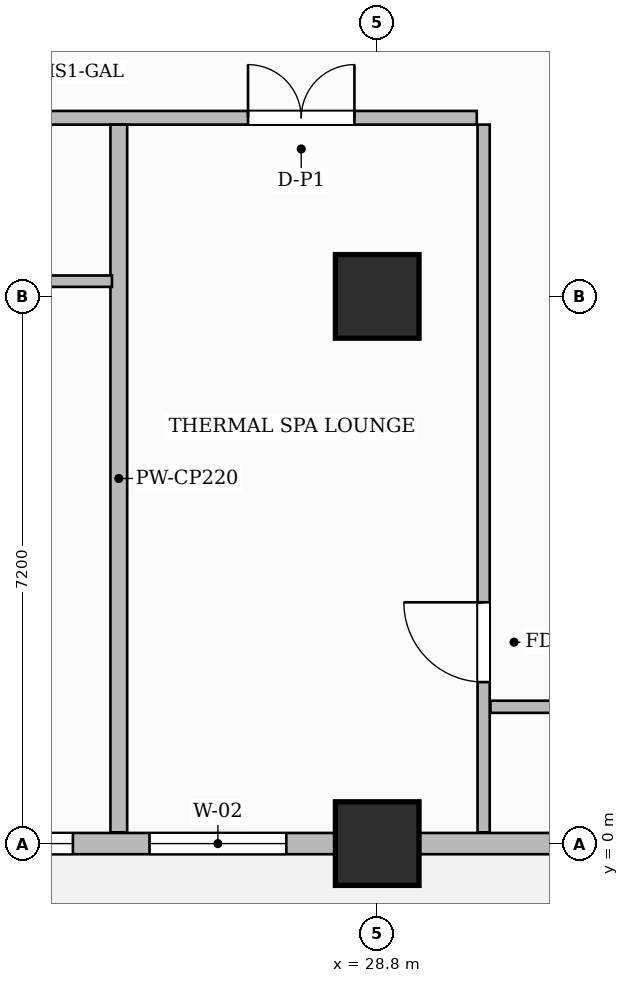
"""IFC4 building model, lengths in metres.
Left out: names, types, materials, properties, quantities, classifications, styles, units other than length and angle.
Written with IfcOpenShell. Run it as: python <this file> out.ifc"""

import sys

from ifc_helpers import new_model, si_unit, direction, frame, frame_2d, origin, origin_2d, place, context, subcontext, project, spatial, rectangle, extrude, source, transform, mapped, element, fill, save


model = new_model("IFC4")
c1 = context("Model", 3, precision=1e-05, world=origin(), true_north=direction((0.0, 1.0)))
c2 = subcontext(c1, "Body", "Model", "MODEL_VIEW")
j1 = project(units=[si_unit("LENGTHUNIT", "METRE"), si_unit("PLANEANGLEUNIT", "RADIAN")], contexts=[c1])
p1 = place(None, origin())
s1 = spatial("IfcSite", under=j1, at=p1, CompositionType="ELEMENT")
p2 = place(p1, origin())
s2 = spatial("IfcBuilding", under=s1, at=p2, CompositionType="ELEMENT")
p3 = place(p2, frame((0.0, 0.0, 58.3)))
s3 = spatial("IfcBuildingStorey", under=s2, at=p3, CompositionType="ELEMENT", Elevation=58.3)
m1 = source(origin(), c2, "Body", "SweptSolid", [
    extrude(rectangle(XDim=1.1, YDim=1.1, at=origin_2d()), origin(), (0.0, 0.0, 1.0), 3.7),
])
for number, where, z_axis, x_axis in (
    (1, (28.8, 0.0, 0.0), (0.0, 0.0, 1.0), (1.0, 0.0, 0.0)),
    (2, (28.8, 7.2, 0.0), (0.0, 0.0, 1.0), (1.0, 0.0, 0.0)),
):
    element("IfcColumn", number, at=place(p3, frame(where, z_axis=z_axis, x_axis=x_axis)), inside=s3, PredefinedType="COLUMN", context=c2, shape_type="MappedRepresentation", body=[
        mapped(m1, transform((0.0, 0.0, 0.0), scale=1.0)),
    ])
p4 = place(p3, frame((14.548, 9.55, 0.0), z_axis=(0.0, 0.0, 1.0), x_axis=(1.0, 0.0, 0.0)))
e3 = element("IfcWall", 3, at=p4, inside=s3, PredefinedType="PARTITIONING", context=c2, shape_type="SweptSolid", body=[
    extrude(rectangle(XDim=15.562, YDim=0.18, at=frame_2d((7.781, 0.0))), origin(), (0.0, 0.0, 1.0), 3.45),
])
p5 = place(p4, frame((3.082, 0.0, 0.0)))
e4 = element("IfcOpeningElement", 4, at=p5, cuts=e3, PredefinedType="OPENING", context=c2, shape_type="SweptSolid", body=[
    extrude(rectangle(XDim=1.05, YDim=2.25, at=frame_2d((0.525, 1.125))), frame((0.0, 0.1, 0.0), z_axis=(0.0, -1.0, 0.0), x_axis=(1.0, 0.0, 0.0)), (0.0, 0.0, 1.0), 0.2),
])
p6 = place(p4, frame((12.552, 0.0, 0.0)))
e5 = element("IfcOpeningElement", 5, at=p6, cuts=e3, PredefinedType="OPENING", context=c2, shape_type="SweptSolid", body=[
    extrude(rectangle(XDim=1.4, YDim=2.35, at=frame_2d((0.7, 1.175))), frame((0.0, 0.1, 0.0), z_axis=(0.0, -1.0, 0.0), x_axis=(1.0, 0.0, 0.0)), (0.0, 0.0, 1.0), 0.2),
])
p7 = place(p3, frame((30.2, 0.148, 0.0), z_axis=(0.0, 0.0, 1.0), x_axis=(0.0, 1.0, 0.0)))
e6 = element("IfcWall", 6, at=p7, inside=s3, PredefinedType="PARTITIONING", context=c2, shape_type="SweptSolid", body=[
    extrude(rectangle(XDim=9.312, YDim=0.16, at=frame_2d((4.656, 0.0))), origin(), (0.0, 0.0, 1.0), 3.45),
])
p8 = place(p7, frame((1.977, 0.0, 0.0)))
e7 = element("IfcOpeningElement", 7, at=p8, cuts=e6, PredefinedType="OPENING", context=c2, shape_type="SweptSolid", body=[
    extrude(rectangle(XDim=1.05, YDim=2.15, at=frame_2d((0.525, 1.075))), frame((0.0, 0.09, 0.0), z_axis=(0.0, -1.0, 0.0), x_axis=(1.0, 0.0, 0.0)), (0.0, 0.0, 1.0), 0.18),
])
p9 = place(p3, frame((30.29, 1.8, 0.0), z_axis=(0.0, 0.0, 1.0), x_axis=(1.0, 0.0, 0.0)))
e8 = element("IfcWall", 8, at=p9, inside=s3, PredefinedType="PARTITIONING", context=c2, shape_type="SweptSolid", body=[
    extrude(rectangle(XDim=19.37, YDim=0.16, at=frame_2d((9.685, 0.0))), origin(), (0.0, 0.0, 1.0), 3.45),
])
p10 = place(p9, frame((9.735, 0.0, 0.0)))
e9 = element("IfcOpeningElement", 9, at=p10, cuts=e8, PredefinedType="OPENING", context=c2, shape_type="SweptSolid", body=[
    extrude(rectangle(XDim=0.95, YDim=2.15, at=frame_2d((0.475, 1.075))), frame((0.0, 0.09, 0.0), z_axis=(0.0, -1.0, 0.0), x_axis=(1.0, 0.0, 0.0)), (0.0, 0.0, 1.0), 0.18),
])
p11 = place(p3, frame((25.4, 0.148, 0.0), z_axis=(0.0, 0.0, 1.0), x_axis=(0.0, 1.0, 0.0)))
e10 = element("IfcWall", 10, at=p11, inside=s3, PredefinedType="PARTITIONING", context=c2, shape_type="SweptSolid", body=[
    extrude(rectangle(XDim=9.312, YDim=0.22, at=frame_2d((4.656, 0.0))), origin(), (0.0, 0.0, 1.0), 3.035),
])
p12 = place(p3, frame((19.57, 7.4, 0.0), z_axis=(0.0, 0.0, 1.0), x_axis=(1.0, 0.0, 0.0)))
e11 = element("IfcWall", 11, at=p12, inside=s3, PredefinedType="PARTITIONING", context=c2, shape_type="SweptSolid", body=[
    extrude(rectangle(XDim=5.74, YDim=0.15, at=frame_2d((2.87, 0.0))), origin(), (0.0, 0.0, 1.0), 2.885),
])
p13 = place(p12, frame((2.762, 0.0, 0.0)))
e12 = element("IfcOpeningElement", 12, at=p13, cuts=e11, PredefinedType="OPENING", context=c2, shape_type="SweptSolid", body=[
    extrude(rectangle(XDim=0.9, YDim=2.15, at=frame_2d((0.45, 1.075))), frame((0.0, 0.085, 0.0), z_axis=(0.0, -1.0, 0.0), x_axis=(1.0, 0.0, 0.0)), (0.0, 0.0, 1.0), 0.17),
])
p14 = place(p3, frame((14.4, 0.0, 0.0), z_axis=(0.0, 0.0, 1.0), x_axis=(1.0, 0.0, 0.0)))
e13 = element("IfcWall", 13, at=p14, inside=s3, PredefinedType="SOLIDWALL", context=c2, shape_type="SweptSolid", body=[
    extrude(rectangle(XDim=43.2, YDim=0.28, at=frame_2d((21.6, 0.0))), origin(), (0.0, 0.0, 1.0), 2.885),
])
p15 = place(p14, frame((1.5, 0.0, 0.0)))
e14 = element("IfcOpeningElement", 14, at=p15, cuts=e13, PredefinedType="OPENING", context=c2, shape_type="SweptSolid", body=[
    extrude(rectangle(XDim=1.2, YDim=2.2, at=frame_2d((0.6, 1.1))), frame((0.0, 0.15, 0.0), z_axis=(0.0, -1.0, 0.0), x_axis=(1.0, 0.0, 0.0)), (0.0, 0.0, 1.0), 0.3),
])
p16 = place(p14, frame((3.336, 0.0, 0.8)))
e15 = element("IfcOpeningElement", 15, at=p16, cuts=e13, PredefinedType="OPENING", context=c2, shape_type="SweptSolid", body=[
    extrude(rectangle(XDim=1.4, YDim=1.85, at=frame_2d((0.7, 0.925))), frame((0.0, 0.15, 0.0), z_axis=(0.0, -1.0, 0.0), x_axis=(1.0, 0.0, 0.0)), (0.0, 0.0, 1.0), 0.3),
])
p17 = place(p14, frame((5.269, 0.0, 0.8)))
e16 = element("IfcOpeningElement", 16, at=p17, cuts=e13, PredefinedType="OPENING", context=c2, shape_type="SweptSolid", body=[
    extrude(rectangle(XDim=0.95, YDim=1.75, at=frame_2d((0.475, 0.875))), frame((0.0, 0.15, 0.0), z_axis=(0.0, -1.0, 0.0), x_axis=(1.0, 0.0, 0.0)), (0.0, 0.0, 1.0), 0.3),
])
p18 = place(p14, frame((8.596, 0.0, 0.8)))
e17 = element("IfcOpeningElement", 17, at=p18, cuts=e13, PredefinedType="OPENING", context=c2, shape_type="SweptSolid", body=[
    extrude(rectangle(XDim=1.8, YDim=1.85, at=frame_2d((0.9, 0.925))), frame((0.0, 0.15, 0.0), z_axis=(0.0, -1.0, 0.0), x_axis=(1.0, 0.0, 0.0)), (0.0, 0.0, 1.0), 0.3),
])
p19 = place(p14, frame((11.404, 0.0, 0.8)))
e18 = element("IfcOpeningElement", 18, at=p19, cuts=e13, PredefinedType="OPENING", context=c2, shape_type="SweptSolid", body=[
    extrude(rectangle(XDim=1.8, YDim=1.85, at=frame_2d((0.9, 0.925))), frame((0.0, 0.15, 0.0), z_axis=(0.0, -1.0, 0.0), x_axis=(1.0, 0.0, 0.0)), (0.0, 0.0, 1.0), 0.3),
])
p20 = place(p14, frame((16.804, 0.0, 0.8)))
e19 = element("IfcOpeningElement", 19, at=p20, cuts=e13, PredefinedType="OPENING", context=c2, shape_type="SweptSolid", body=[
    extrude(rectangle(XDim=1.8, YDim=1.85, at=frame_2d((0.9, 0.925))), frame((0.0, 0.15, 0.0), z_axis=(0.0, -1.0, 0.0), x_axis=(1.0, 0.0, 0.0)), (0.0, 0.0, 1.0), 0.3),
])
p21 = place(p14, frame((21.725, 0.0, 0.8)))
e20 = element("IfcOpeningElement", 20, at=p21, cuts=e13, PredefinedType="OPENING", context=c2, shape_type="SweptSolid", body=[
    extrude(rectangle(XDim=1.8, YDim=1.85, at=frame_2d((0.9, 0.925))), frame((0.0, 0.15, 0.0), z_axis=(0.0, -1.0, 0.0), x_axis=(1.0, 0.0, 0.0)), (0.0, 0.0, 1.0), 0.3),
])
p22 = place(p14, frame((24.475, 0.0, 0.8)))
e21 = element("IfcOpeningElement", 21, at=p22, cuts=e13, PredefinedType="OPENING", context=c2, shape_type="SweptSolid", body=[
    extrude(rectangle(XDim=1.8, YDim=1.85, at=frame_2d((0.9, 0.925))), frame((0.0, 0.15, 0.0), z_axis=(0.0, -1.0, 0.0), x_axis=(1.0, 0.0, 0.0)), (0.0, 0.0, 1.0), 0.3),
])
p23 = place(p14, frame((29.075, 0.0, 0.8)))
e22 = element("IfcOpeningElement", 22, at=p23, cuts=e13, PredefinedType="OPENING", context=c2, shape_type="SweptSolid", body=[
    extrude(rectangle(XDim=1.8, YDim=1.85, at=frame_2d((0.9, 0.925))), frame((0.0, 0.15, 0.0), z_axis=(0.0, -1.0, 0.0), x_axis=(1.0, 0.0, 0.0)), (0.0, 0.0, 1.0), 0.3),
])
p24 = place(p14, frame((32.125, 0.0, 0.8)))
e23 = element("IfcOpeningElement", 23, at=p24, cuts=e13, PredefinedType="OPENING", context=c2, shape_type="SweptSolid", body=[
    extrude(rectangle(XDim=1.8, YDim=1.85, at=frame_2d((0.9, 0.925))), frame((0.0, 0.15, 0.0), z_axis=(0.0, -1.0, 0.0), x_axis=(1.0, 0.0, 0.0)), (0.0, 0.0, 1.0), 0.3),
])
p25 = place(p14, frame((36.875, 0.0, 0.8)))
e24 = element("IfcOpeningElement", 24, at=p25, cuts=e13, PredefinedType="OPENING", context=c2, shape_type="SweptSolid", body=[
    extrude(rectangle(XDim=1.8, YDim=1.85, at=frame_2d((0.9, 0.925))), frame((0.0, 0.15, 0.0), z_axis=(0.0, -1.0, 0.0), x_axis=(1.0, 0.0, 0.0)), (0.0, 0.0, 1.0), 0.3),
])
p26 = place(p14, frame((39.925, 0.0, 0.8)))
e25 = element("IfcOpeningElement", 25, at=p26, cuts=e13, PredefinedType="OPENING", context=c2, shape_type="SweptSolid", body=[
    extrude(rectangle(XDim=1.8, YDim=1.85, at=frame_2d((0.9, 0.925))), frame((0.0, 0.15, 0.0), z_axis=(0.0, -1.0, 0.0), x_axis=(1.0, 0.0, 0.0)), (0.0, 0.0, 1.0), 0.3),
])
m2 = source(origin(), c2, "Body", "SweptSolid", [
    extrude(rectangle(XDim=1.05, YDim=2.15, at=frame_2d((0.525, 1.075))), frame((0.0, 0.025, 0.0), z_axis=(0.0, -1.0, 0.0), x_axis=(1.0, 0.0, 0.0)), (0.0, 0.0, 1.0), 0.05),
])
p27 = place(p8, origin())
e26 = element("IfcDoor", 26, at=p27, inside=s3, OperationType="SINGLE_SWING_RIGHT", PredefinedType="DOOR", context=c2, shape_type="MappedRepresentation", body=[
    mapped(m2, transform((0.0, 0.0, 0.0), scale=1.0)),
])
fill(e7, e26)
m3 = source(origin(), c2, "Body", "SweptSolid", [
    extrude(rectangle(XDim=1.4, YDim=2.35, at=frame_2d((0.7, 1.175))), frame((0.0, 0.025, 0.0), z_axis=(0.0, -1.0, 0.0), x_axis=(1.0, 0.0, 0.0)), (0.0, 0.0, 1.0), 0.05),
])
p28 = place(p6, origin())
e27 = element("IfcDoor", 27, at=p28, inside=s3, OperationType="DOUBLE_DOOR_SINGLE_SWING", PredefinedType="DOOR", context=c2, shape_type="MappedRepresentation", body=[
    mapped(m3, transform((0.0, 0.0, 0.0), scale=1.0)),
])
fill(e5, e27)
m4 = source(origin(), c2, "Body", "SweptSolid", [
    extrude(rectangle(XDim=1.8, YDim=1.85, at=frame_2d((0.9, 0.925))), frame((0.0, 0.03, 0.0), z_axis=(0.0, -1.0, 0.0), x_axis=(1.0, 0.0, 0.0)), (0.0, 0.0, 1.0), 0.06),
])
p29 = place(p18, origin())
e28 = element("IfcWindow", 28, at=p29, inside=s3, PartitioningType="DOUBLE_PANEL_VERTICAL", PredefinedType="WINDOW", context=c2, shape_type="MappedRepresentation", body=[
    mapped(m4, transform((0.0, 0.0, 0.0), scale=1.0)),
])
fill(e17, e28)
p30 = place(p19, origin())
e29 = element("IfcWindow", 29, at=p30, inside=s3, PartitioningType="DOUBLE_PANEL_VERTICAL", PredefinedType="WINDOW", context=c2, shape_type="MappedRepresentation", body=[
    mapped(m4, transform((0.0, 0.0, 0.0), scale=1.0)),
])
fill(e18, e29)
save(model, sys.argv[1])
